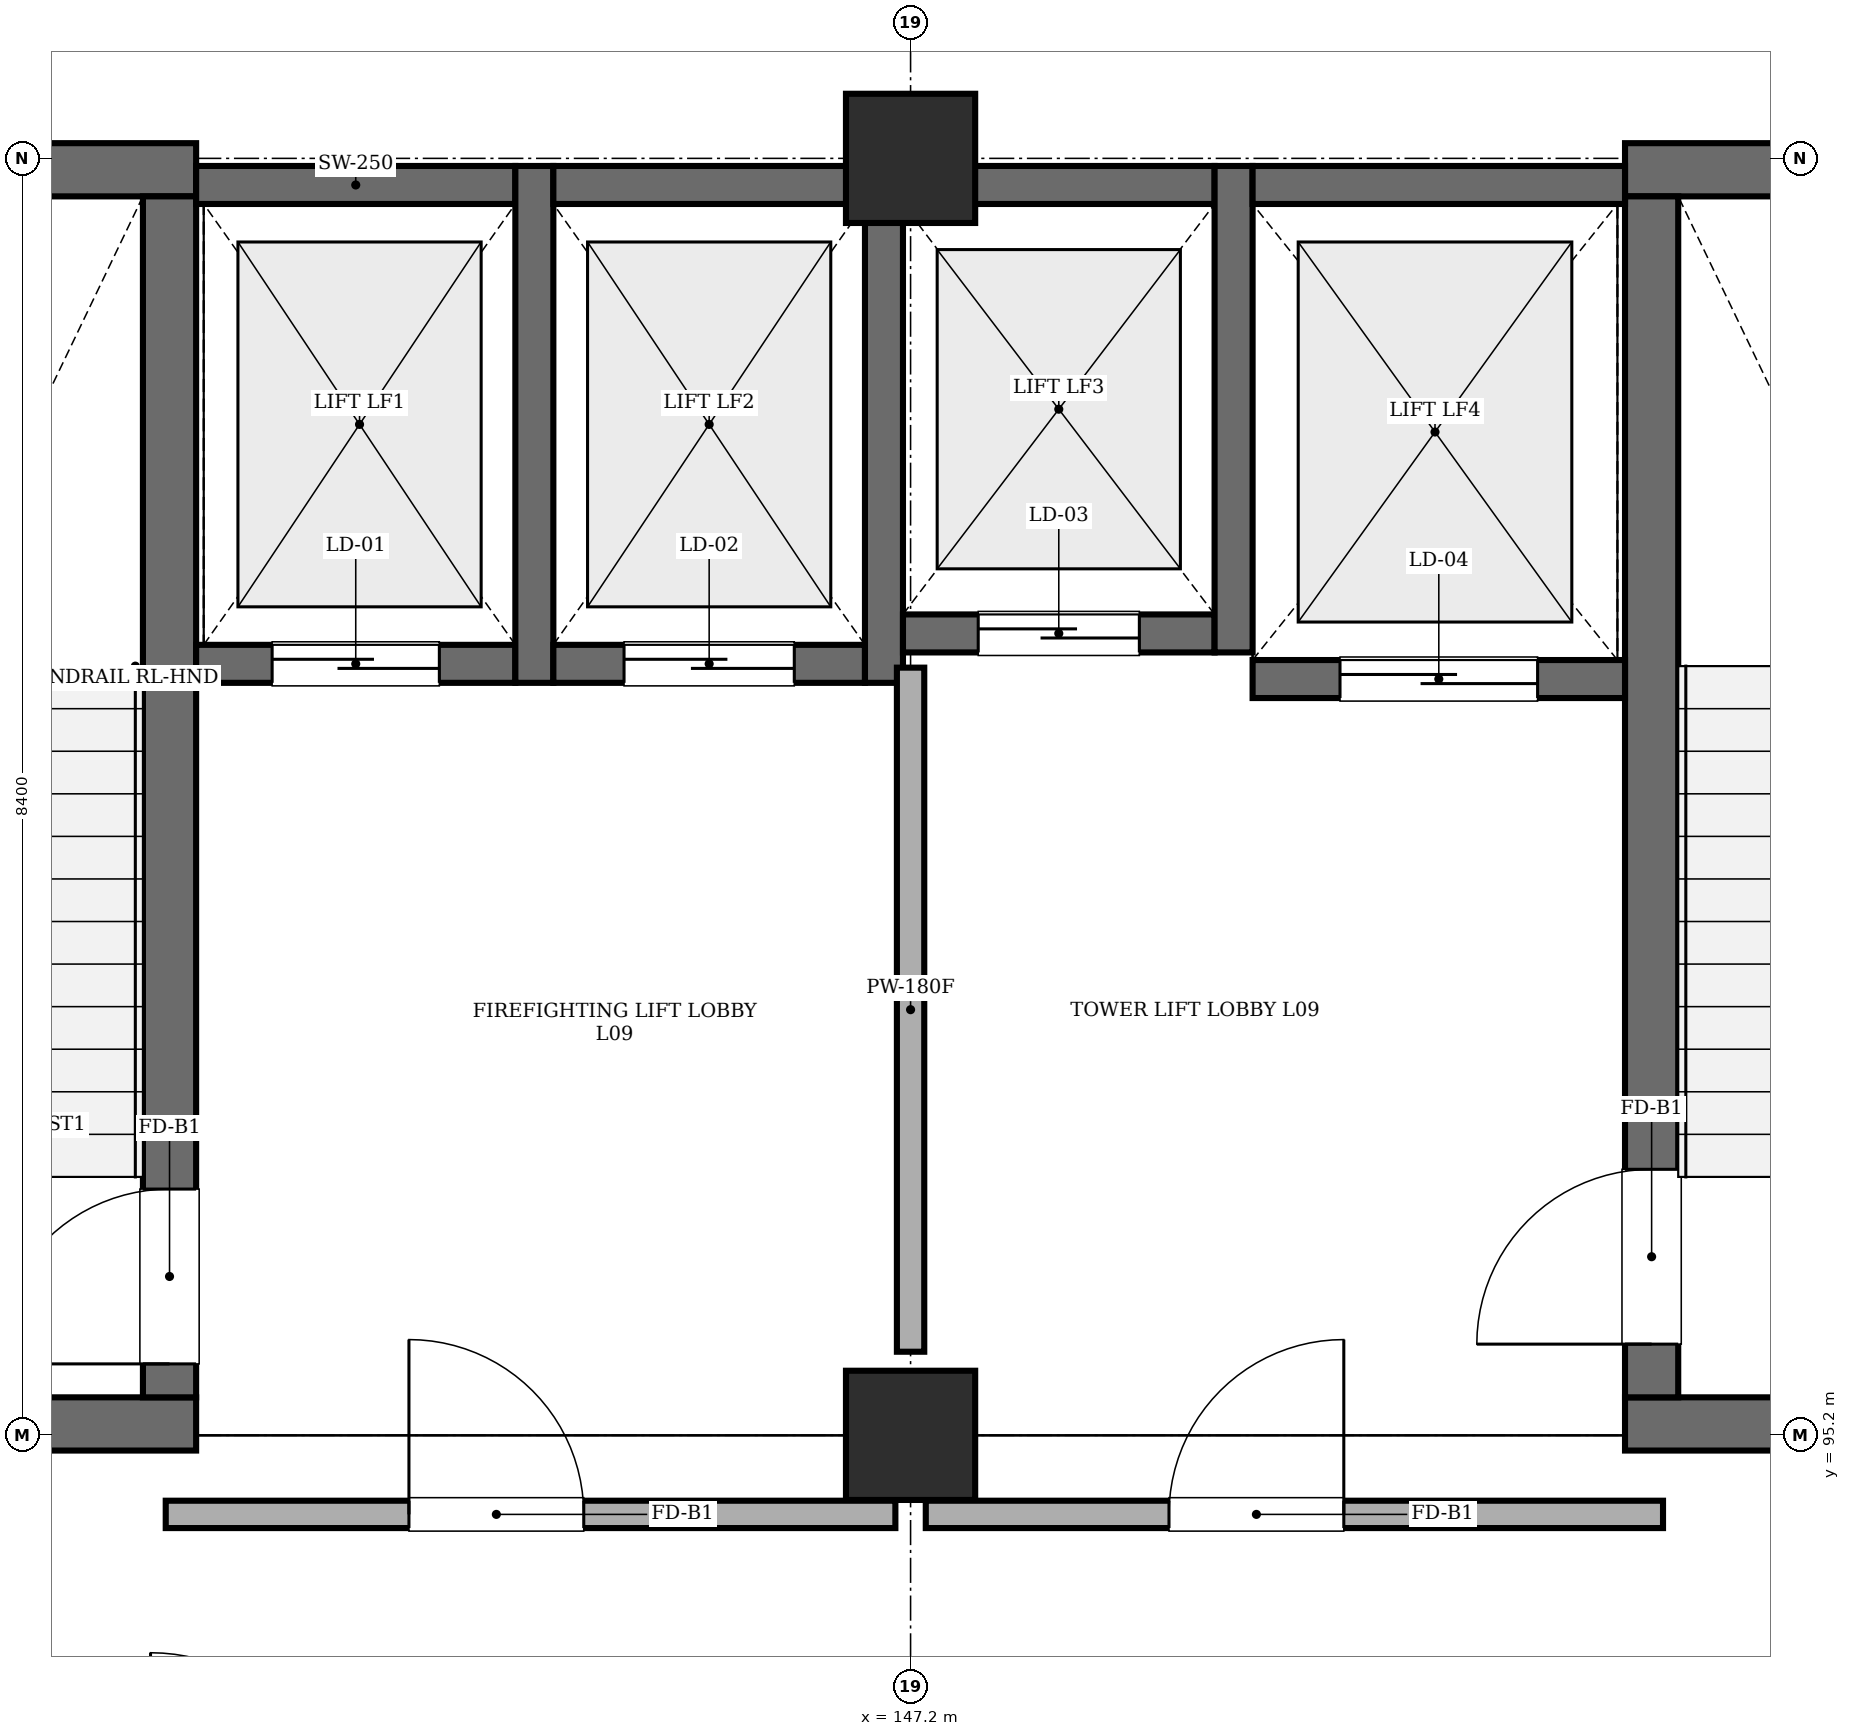
"""IFC4 building model, lengths in metres.
Left out: names, types, materials, properties, quantities, classifications, styles, units other than length and angle.
Written with IfcOpenShell. Run it as: python <this file> out.ifc"""

import sys

from ifc_helpers import new_model, si_unit, direction, frame, frame_2d, origin, origin_2d, place, context, subcontext, project, spatial, rectangle, extrude, element, fill, save


model = new_model("IFC4")
c1 = context("Model", 3, precision=1e-05, world=origin(), true_north=direction((0.0, 1.0)))
c2 = subcontext(c1, "Body", "Model", "MODEL_VIEW")
j1 = project(units=[si_unit("LENGTHUNIT", "METRE"), si_unit("PLANEANGLEUNIT", "RADIAN")], contexts=[c1])
p1 = place(None, origin())
s1 = spatial("IfcSite", under=j1, at=p1, CompositionType="ELEMENT")
p2 = place(p1, origin())
s2 = spatial("IfcBuilding", under=s1, at=p2, CompositionType="ELEMENT")
p3 = place(p2, frame((0.0, 0.0, 36.0)))
s3 = spatial("IfcBuildingStorey", under=s2, at=p3, CompositionType="ELEMENT", Elevation=36.0)
for number, where, z_axis, x_axis in (
    (1, (147.2, 95.2, 0.0), (0.0, 0.0, 1.0), (1.0, 0.0, 0.0)),
    (2, (147.2, 103.6, 0.0), (0.0, 0.0, 1.0), (1.0, 0.0, 0.0)),
):
    element("IfcColumn", number, at=place(p3, frame(where, z_axis=z_axis, x_axis=x_axis)), inside=s3, PredefinedType="COLUMN", context=c2, shape_type="SweptSolid", body=[
        extrude(rectangle(XDim=0.85, YDim=0.85, at=origin_2d()), origin(), (0.0, 0.0, 1.0), 4.02),
    ])
for number, where, z_axis, x_axis in (
    (3, (138.7, 95.275, 0.0), (0.0, 0.0, 1.0), (1.0, 0.0, 0.0)),
    (4, (138.7, 103.525, 0.0), (0.0, 0.0, 1.0), (1.0, 0.0, 0.0)),
):
    element("IfcWall", number, at=place(p3, frame(where, z_axis=z_axis, x_axis=x_axis)), inside=s3, PredefinedType="SHEAR", context=c2, shape_type="SweptSolid", body=[
        extrude(rectangle(XDim=3.8, YDim=0.35, at=frame_2d((1.9, 0.0))), origin(), (0.0, 0.0, 1.0), 4.02),
    ])
p4 = place(p3, frame((142.325, 95.45, 0.0), z_axis=(0.0, 0.0, 1.0), x_axis=(0.0, 1.0, 0.0)))
e5 = element("IfcWall", 5, at=p4, inside=s3, PredefinedType="SHEAR", context=c2, shape_type="SweptSolid", body=[
    extrude(rectangle(XDim=7.9, YDim=0.35, at=frame_2d((3.95, 0.0))), origin(), (0.0, 0.0, 1.0), 4.02),
])
p5 = place(p4, frame((0.22, 0.0, 0.0)))
e6 = element("IfcOpeningElement", 6, at=p5, cuts=e5, PredefinedType="OPENING", context=c2, shape_type="SweptSolid", body=[
    extrude(rectangle(XDim=1.15, YDim=2.15, at=frame_2d((0.575, 1.075))), frame((0.0, 0.185, 0.0), z_axis=(0.0, -1.0, 0.0), x_axis=(1.0, 0.0, 0.0)), (0.0, 0.0, 1.0), 0.37),
])
for number, where, z_axis, x_axis in (
    (7, (151.9, 95.275, 0.0), (0.0, 0.0, 1.0), (1.0, 0.0, 0.0)),
    (8, (151.9, 103.525, 0.0), (0.0, 0.0, 1.0), (1.0, 0.0, 0.0)),
):
    element("IfcWall", number, at=place(p3, frame(where, z_axis=z_axis, x_axis=x_axis)), inside=s3, PredefinedType="SHEAR", context=c2, shape_type="SweptSolid", body=[
        extrude(rectangle(XDim=3.8, YDim=0.35, at=frame_2d((1.9, 0.0))), origin(), (0.0, 0.0, 1.0), 4.02),
    ])
p6 = place(p3, frame((152.075, 95.45, 0.0), z_axis=(0.0, 0.0, 1.0), x_axis=(0.0, 1.0, 0.0)))
e9 = element("IfcWall", 9, at=p6, inside=s3, PredefinedType="SHEAR", context=c2, shape_type="SweptSolid", body=[
    extrude(rectangle(XDim=7.9, YDim=0.35, at=frame_2d((3.95, 0.0))), origin(), (0.0, 0.0, 1.0), 4.02),
])
p7 = place(p6, frame((0.35, 0.0, 0.0)))
e10 = element("IfcOpeningElement", 10, at=p7, cuts=e9, PredefinedType="OPENING", context=c2, shape_type="SweptSolid", body=[
    extrude(rectangle(XDim=1.15, YDim=2.15, at=frame_2d((0.575, 1.075))), frame((0.0, 0.185, 0.0), z_axis=(0.0, -1.0, 0.0), x_axis=(1.0, 0.0, 0.0)), (0.0, 0.0, 1.0), 0.37),
])
p8 = place(p3, frame((142.5, 100.275, 0.0), z_axis=(0.0, 0.0, 1.0), x_axis=(1.0, 0.0, 0.0)))
e11 = element("IfcWall", 11, at=p8, inside=s3, PredefinedType="SHEAR", context=c2, shape_type="SweptSolid", body=[
    extrude(rectangle(XDim=2.1, YDim=0.25, at=frame_2d((1.05, 0.0))), origin(), (0.0, 0.0, 1.0), 4.02),
])
p9 = place(p8, frame((0.5, 0.0, 0.0)))
e12 = element("IfcOpeningElement", 12, at=p9, cuts=e11, PredefinedType="OPENING", context=c2, shape_type="SweptSolid", body=[
    extrude(rectangle(XDim=1.1, YDim=2.15, at=frame_2d((0.55, 1.075))), frame((0.0, 0.135, 0.0), z_axis=(0.0, -1.0, 0.0), x_axis=(1.0, 0.0, 0.0)), (0.0, 0.0, 1.0), 0.27),
])
p10 = place(p3, frame((142.5, 103.425, 0.0), z_axis=(0.0, 0.0, 1.0), x_axis=(1.0, 0.0, 0.0)))
e13 = element("IfcWall", 13, at=p10, inside=s3, PredefinedType="SHEAR", context=c2, shape_type="SweptSolid", body=[
    extrude(rectangle(XDim=2.1, YDim=0.25, at=frame_2d((1.05, 0.0))), origin(), (0.0, 0.0, 1.0), 4.02),
])
p11 = place(p3, frame((144.725, 100.15, 0.0), z_axis=(0.0, 0.0, 1.0), x_axis=(0.0, 1.0, 0.0)))
e14 = element("IfcWall", 14, at=p11, inside=s3, PredefinedType="SHEAR", context=c2, shape_type="SweptSolid", body=[
    extrude(rectangle(XDim=3.4, YDim=0.25, at=frame_2d((1.7, 0.0))), origin(), (0.0, 0.0, 1.0), 4.02),
])
p12 = place(p3, frame((144.85, 100.275, 0.0), z_axis=(0.0, 0.0, 1.0), x_axis=(1.0, 0.0, 0.0)))
e15 = element("IfcWall", 15, at=p12, inside=s3, PredefinedType="SHEAR", context=c2, shape_type="SweptSolid", body=[
    extrude(rectangle(XDim=2.05, YDim=0.25, at=frame_2d((1.025, 0.0))), origin(), (0.0, 0.0, 1.0), 4.02),
])
p13 = place(p12, frame((0.465, 0.0, 0.0)))
e16 = element("IfcOpeningElement", 16, at=p13, cuts=e15, PredefinedType="OPENING", context=c2, shape_type="SweptSolid", body=[
    extrude(rectangle(XDim=1.12, YDim=2.15, at=frame_2d((0.56, 1.075))), frame((0.0, 0.135, 0.0), z_axis=(0.0, -1.0, 0.0), x_axis=(1.0, 0.0, 0.0)), (0.0, 0.0, 1.0), 0.27),
])
p14 = place(p3, frame((144.85, 103.425, 0.0), z_axis=(0.0, 0.0, 1.0), x_axis=(1.0, 0.0, 0.0)))
e17 = element("IfcWall", 17, at=p14, inside=s3, PredefinedType="SHEAR", context=c2, shape_type="SweptSolid", body=[
    extrude(rectangle(XDim=2.05, YDim=0.25, at=frame_2d((1.025, 0.0))), origin(), (0.0, 0.0, 1.0), 4.02),
])
p15 = place(p3, frame((147.025, 100.15, 0.0), z_axis=(0.0, 0.0, 1.0), x_axis=(0.0, 1.0, 0.0)))
e18 = element("IfcWall", 18, at=p15, inside=s3, PredefinedType="SHEAR", context=c2, shape_type="SweptSolid", body=[
    extrude(rectangle(XDim=3.4, YDim=0.25, at=frame_2d((1.7, 0.0))), origin(), (0.0, 0.0, 1.0), 4.02),
])
p16 = place(p3, frame((147.15, 100.475, 0.0), z_axis=(0.0, 0.0, 1.0), x_axis=(1.0, 0.0, 0.0)))
e19 = element("IfcWall", 19, at=p16, inside=s3, PredefinedType="SHEAR", context=c2, shape_type="SweptSolid", body=[
    extrude(rectangle(XDim=2.05, YDim=0.25, at=frame_2d((1.025, 0.0))), origin(), (0.0, 0.0, 1.0), 4.02),
])
p17 = place(p16, frame((0.495, 0.0, 0.0)))
e20 = element("IfcOpeningElement", 20, at=p17, cuts=e19, PredefinedType="OPENING", context=c2, shape_type="SweptSolid", body=[
    extrude(rectangle(XDim=1.06, YDim=2.15, at=frame_2d((0.53, 1.075))), frame((0.0, 0.135, 0.0), z_axis=(0.0, -1.0, 0.0), x_axis=(1.0, 0.0, 0.0)), (0.0, 0.0, 1.0), 0.27),
])
p18 = place(p3, frame((147.15, 103.425, 0.0), z_axis=(0.0, 0.0, 1.0), x_axis=(1.0, 0.0, 0.0)))
e21 = element("IfcWall", 21, at=p18, inside=s3, PredefinedType="SHEAR", context=c2, shape_type="SweptSolid", body=[
    extrude(rectangle(XDim=2.05, YDim=0.25, at=frame_2d((1.025, 0.0))), origin(), (0.0, 0.0, 1.0), 4.02),
])
p19 = place(p3, frame((149.325, 100.35, 0.0), z_axis=(0.0, 0.0, 1.0), x_axis=(0.0, 1.0, 0.0)))
e22 = element("IfcWall", 22, at=p19, inside=s3, PredefinedType="SHEAR", context=c2, shape_type="SweptSolid", body=[
    extrude(rectangle(XDim=3.2, YDim=0.25, at=frame_2d((1.6, 0.0))), origin(), (0.0, 0.0, 1.0), 4.02),
])
p20 = place(p3, frame((149.45, 100.175, 0.0), z_axis=(0.0, 0.0, 1.0), x_axis=(1.0, 0.0, 0.0)))
e23 = element("IfcWall", 23, at=p20, inside=s3, PredefinedType="SHEAR", context=c2, shape_type="SweptSolid", body=[
    extrude(rectangle(XDim=2.45, YDim=0.25, at=frame_2d((1.225, 0.0))), origin(), (0.0, 0.0, 1.0), 4.02),
])
p21 = place(p20, frame((0.575, 0.0, 0.0)))
e24 = element("IfcOpeningElement", 24, at=p21, cuts=e23, PredefinedType="OPENING", context=c2, shape_type="SweptSolid", body=[
    extrude(rectangle(XDim=1.3, YDim=2.25, at=frame_2d((0.65, 1.125))), frame((0.0, 0.135, 0.0), z_axis=(0.0, -1.0, 0.0), x_axis=(1.0, 0.0, 0.0)), (0.0, 0.0, 1.0), 0.27),
])
p22 = place(p3, frame((149.45, 103.425, 0.0), z_axis=(0.0, 0.0, 1.0), x_axis=(1.0, 0.0, 0.0)))
e25 = element("IfcWall", 25, at=p22, inside=s3, PredefinedType="SHEAR", context=c2, shape_type="SweptSolid", body=[
    extrude(rectangle(XDim=2.45, YDim=0.25, at=frame_2d((1.225, 0.0))), origin(), (0.0, 0.0, 1.0), 4.02),
])
p23 = place(p3, frame((142.3, 94.68, 0.0), z_axis=(0.0, 0.0, 1.0), x_axis=(1.0, 0.0, 0.0)))
e26 = element("IfcWall", 26, at=p23, inside=s3, PredefinedType="STANDARD", context=c2, shape_type="SweptSolid", body=[
    extrude(rectangle(XDim=4.8, YDim=0.18, at=frame_2d((2.4, 0.0))), origin(), (0.0, 0.0, 1.0), 4.02),
])
p24 = place(p23, frame((1.6, 0.0, 0.0)))
e27 = element("IfcOpeningElement", 27, at=p24, cuts=e26, PredefinedType="OPENING", context=c2, shape_type="SweptSolid", body=[
    extrude(rectangle(XDim=1.15, YDim=2.15, at=frame_2d((0.575, 1.075))), frame((0.0, 0.1, 0.0), z_axis=(0.0, -1.0, 0.0), x_axis=(1.0, 0.0, 0.0)), (0.0, 0.0, 1.0), 0.2),
])
p25 = place(p3, frame((147.3, 94.68, 0.0), z_axis=(0.0, 0.0, 1.0), x_axis=(1.0, 0.0, 0.0)))
e28 = element("IfcWall", 28, at=p25, inside=s3, PredefinedType="STANDARD", context=c2, shape_type="SweptSolid", body=[
    extrude(rectangle(XDim=4.85, YDim=0.18, at=frame_2d((2.425, 0.0))), origin(), (0.0, 0.0, 1.0), 4.02),
])
p26 = place(p25, frame((1.6, 0.0, 0.0)))
e29 = element("IfcOpeningElement", 29, at=p26, cuts=e28, PredefinedType="OPENING", context=c2, shape_type="SweptSolid", body=[
    extrude(rectangle(XDim=1.15, YDim=2.15, at=frame_2d((0.575, 1.075))), frame((0.0, 0.1, 0.0), z_axis=(0.0, -1.0, 0.0), x_axis=(1.0, 0.0, 0.0)), (0.0, 0.0, 1.0), 0.2),
])
p27 = place(p3, frame((147.2, 95.75, 0.0), z_axis=(0.0, 0.0, 1.0), x_axis=(0.0, 1.0, 0.0)))
e30 = element("IfcWall", 30, at=p27, inside=s3, PredefinedType="STANDARD", context=c2, shape_type="SweptSolid", body=[
    extrude(rectangle(XDim=4.5, YDim=0.18, at=frame_2d((2.25, 0.0))), origin(), (0.0, 0.0, 1.0), 3.32),
])
p28 = place(p24, origin())
e31 = element("IfcDoor", 31, at=p28, inside=s3, OperationType="SINGLE_SWING_LEFT", PredefinedType="DOOR", context=c2, shape_type="SweptSolid", body=[
    extrude(rectangle(XDim=1.15, YDim=2.15, at=frame_2d((0.575, 1.075))), frame((0.0, 0.025, 0.0), z_axis=(0.0, -1.0, 0.0), x_axis=(1.0, 0.0, 0.0)), (0.0, 0.0, 1.0), 0.05),
])
fill(e27, e31)
p29 = place(p26, origin())
e32 = element("IfcDoor", 32, at=p29, inside=s3, OperationType="SINGLE_SWING_RIGHT", PredefinedType="DOOR", context=c2, shape_type="SweptSolid", body=[
    extrude(rectangle(XDim=1.15, YDim=2.15, at=frame_2d((0.575, 1.075))), frame((0.0, 0.025, 0.0), z_axis=(0.0, -1.0, 0.0), x_axis=(1.0, 0.0, 0.0)), (0.0, 0.0, 1.0), 0.05),
])
fill(e29, e32)
p30 = place(p5, origin())
e33 = element("IfcDoor", 33, at=p30, inside=s3, OperationType="SINGLE_SWING_LEFT", PredefinedType="DOOR", context=c2, shape_type="SweptSolid", body=[
    extrude(rectangle(XDim=1.15, YDim=2.15, at=frame_2d((0.575, 1.075))), frame((0.0, 0.025, 0.0), z_axis=(0.0, -1.0, 0.0), x_axis=(1.0, 0.0, 0.0)), (0.0, 0.0, 1.0), 0.05),
])
fill(e6, e33)
p31 = place(p7, origin())
e34 = element("IfcDoor", 34, at=p31, inside=s3, OperationType="SINGLE_SWING_LEFT", PredefinedType="DOOR", context=c2, shape_type="SweptSolid", body=[
    extrude(rectangle(XDim=1.15, YDim=2.15, at=frame_2d((0.575, 1.075))), frame((0.0, 0.025, 0.0), z_axis=(0.0, -1.0, 0.0), x_axis=(1.0, 0.0, 0.0)), (0.0, 0.0, 1.0), 0.05),
])
fill(e10, e34)
p32 = place(p9, origin())
e35 = element("IfcDoor", 35, at=p32, inside=s3, OperationType="SLIDING_TO_LEFT", PredefinedType="DOOR", context=c2, shape_type="SweptSolid", body=[
    extrude(rectangle(XDim=1.1, YDim=2.15, at=frame_2d((0.55, 1.075))), frame((0.0, 0.025, 0.0), z_axis=(0.0, -1.0, 0.0), x_axis=(1.0, 0.0, 0.0)), (0.0, 0.0, 1.0), 0.05),
])
fill(e12, e35)
p33 = place(p13, origin())
e36 = element("IfcDoor", 36, at=p33, inside=s3, OperationType="SLIDING_TO_LEFT", PredefinedType="DOOR", context=c2, shape_type="SweptSolid", body=[
    extrude(rectangle(XDim=1.12, YDim=2.15, at=frame_2d((0.56, 1.075))), frame((0.0, 0.025, 0.0), z_axis=(0.0, -1.0, 0.0), x_axis=(1.0, 0.0, 0.0)), (0.0, 0.0, 1.0), 0.05),
])
fill(e16, e36)
p34 = place(p17, origin())
e37 = element("IfcDoor", 37, at=p34, inside=s3, OperationType="SLIDING_TO_LEFT", PredefinedType="DOOR", context=c2, shape_type="SweptSolid", body=[
    extrude(rectangle(XDim=1.06, YDim=2.15, at=frame_2d((0.53, 1.075))), frame((0.0, 0.025, 0.0), z_axis=(0.0, -1.0, 0.0), x_axis=(1.0, 0.0, 0.0)), (0.0, 0.0, 1.0), 0.05),
])
fill(e20, e37)
p35 = place(p21, origin())
e38 = element("IfcDoor", 38, at=p35, inside=s3, OperationType="SLIDING_TO_LEFT", PredefinedType="DOOR", context=c2, shape_type="SweptSolid", body=[
    extrude(rectangle(XDim=1.3, YDim=2.25, at=frame_2d((0.65, 1.125))), frame((0.0, 0.025, 0.0), z_axis=(0.0, -1.0, 0.0), x_axis=(1.0, 0.0, 0.0)), (0.0, 0.0, 1.0), 0.05),
])
fill(e24, e38)
save(model, sys.argv[1])
